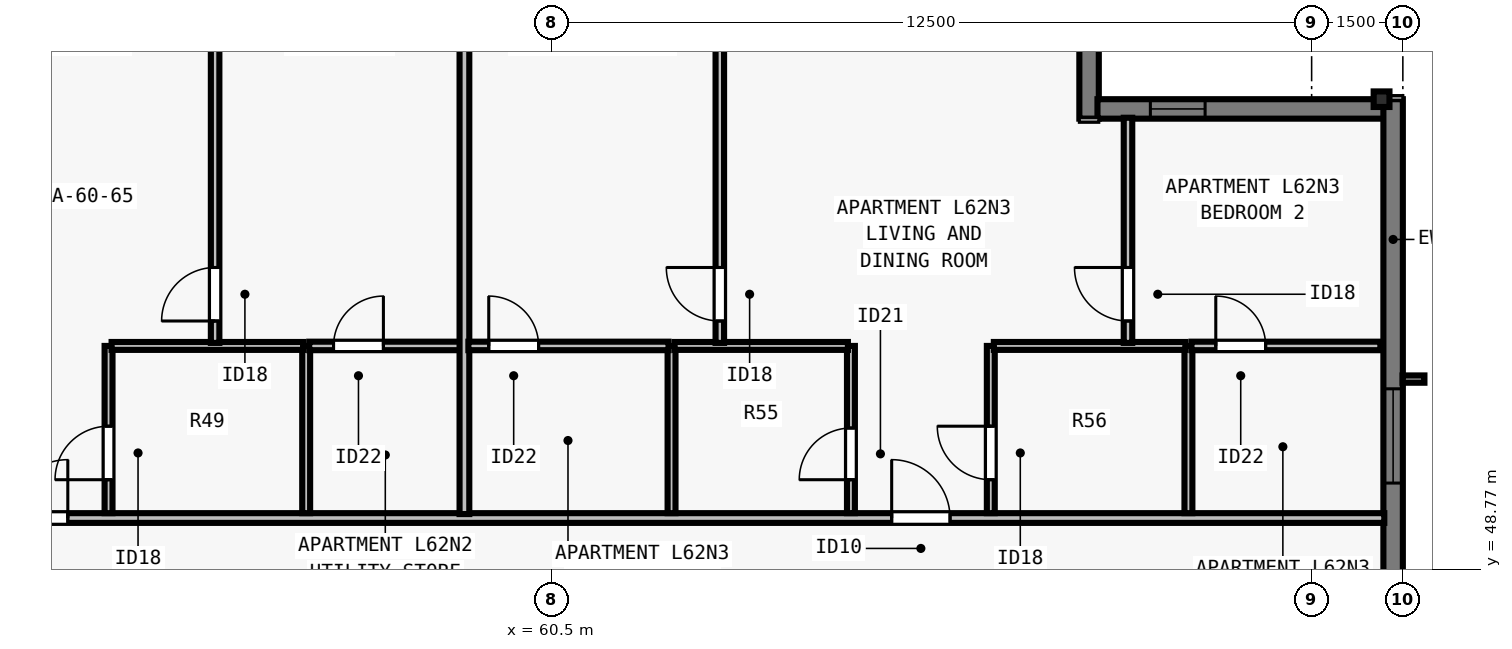
"""IFC4 building model, lengths in metres.
Left out: names, types, materials, properties, quantities, classifications, styles, units other than length and angle.
Written with IfcOpenShell. Run it as: python <this file> out.ifc"""

import sys

from ifc_helpers import new_model, si_unit, direction, frame, frame_2d, origin, origin_2d, place, context, subcontext, project, spatial, rectangle, i_section, extrude, element, fill, save


model = new_model("IFC4")
c1 = context("Model", 3, precision=1e-05, world=origin(), true_north=direction((0.0, 1.0)))
c2 = subcontext(c1, "Body", "Model", "MODEL_VIEW")
j1 = project(units=[si_unit("LENGTHUNIT", "METRE"), si_unit("PLANEANGLEUNIT", "RADIAN")], contexts=[c1])
p1 = place(None, origin())
s1 = spatial("IfcSite", under=j1, at=p1, CompositionType="ELEMENT")
p2 = place(p1, origin())
s2 = spatial("IfcBuilding", under=s1, at=p2, CompositionType="ELEMENT")
p3 = place(p2, frame((0.0, 0.0, 227.0)))
s3 = spatial("IfcBuildingStorey", under=s2, at=p3, CompositionType="ELEMENT", Elevation=227.0)
p4 = place(p3, frame((74.15, 56.5, 0.0), z_axis=(0.0, 0.0, 1.0), x_axis=(0.0, 1.0, 0.0)))
e1 = element("IfcColumn", 1, at=p4, inside=s3, PredefinedType="COLUMN", context=c2, shape_type="SweptSolid", body=[
    extrude(i_section(OverallWidth=0.256, OverallDepth=0.26, WebThickness=0.01, FlangeThickness=0.017, FilletRadius=0.013, at=origin_2d()), origin(), (0.0, 0.0, 1.0), 3.5),
])
p5 = place(p3, frame((69.34, 61.5, 0.0), z_axis=(0.0, 0.0, 1.0), x_axis=(0.0, -1.0, 0.0)))
e2 = element("IfcWall", 2, at=p5, inside=s3, PredefinedType="SOLIDWALL", context=c2, shape_type="SweptSolid", body=[
    extrude(rectangle(XDim=5.32, YDim=0.32, at=frame_2d((2.66, 0.0))), origin(), (0.0, 0.0, 1.0), 3.29),
])
p6 = place(p3, frame((69.478, 56.34, 0.0), z_axis=(0.0, 0.0, 1.0), x_axis=(1.0, 0.0, 0.0)))
e3 = element("IfcWall", 3, at=p6, inside=s3, PredefinedType="SOLIDWALL", context=c2, shape_type="SweptSolid", body=[
    extrude(rectangle(XDim=4.724, YDim=0.32, at=frame_2d((2.362, 0.0))), origin(), (0.0, 0.0, 1.0), 3.29),
])
p7 = place(p6, frame((0.87, 0.0, 0.8)))
e4 = element("IfcOpeningElement", 4, at=p7, cuts=e3, PredefinedType="OPENING", context=c2, shape_type="SweptSolid", body=[
    extrude(rectangle(XDim=0.9, YDim=1.678, at=frame_2d((0.45, 0.839))), frame((0.0, 0.17, 0.0), z_axis=(0.0, -1.0, 0.0), x_axis=(1.0, 0.0, 0.0)), (0.0, 0.0, 1.0), 0.34),
])
p8 = place(p3, frame((74.34, 56.5, 0.0), z_axis=(0.0, 0.0, 1.0), x_axis=(0.0, -1.0, 0.0)))
e5 = element("IfcWall", 5, at=p8, inside=s3, PredefinedType="SOLIDWALL", context=c2, shape_type="SweptSolid", body=[
    extrude(rectangle(XDim=34.702, YDim=0.32, at=frame_2d((17.351, 0.0))), origin(), (0.0, 0.0, 1.0), 3.29),
])
p9 = place(p8, frame((4.763, 0.0, 0.8)))
e6 = element("IfcOpeningElement", 6, at=p9, cuts=e5, PredefinedType="OPENING", context=c2, shape_type="SweptSolid", body=[
    extrude(rectangle(XDim=1.55, YDim=1.678, at=frame_2d((0.775, 0.839))), frame((0.0, 0.17, 0.0), z_axis=(0.0, -1.0, 0.0), x_axis=(1.0, 0.0, 0.0)), (0.0, 0.0, 1.0), 0.34),
])
p10 = place(p8, frame((9.238, 0.0, 0.8)))
e7 = element("IfcOpeningElement", 7, at=p10, cuts=e5, PredefinedType="OPENING", context=c2, shape_type="SweptSolid", body=[
    extrude(rectangle(XDim=1.85, YDim=1.678, at=frame_2d((0.925, 0.839))), frame((0.0, 0.17, 0.0), z_axis=(0.0, -1.0, 0.0), x_axis=(1.0, 0.0, 0.0)), (0.0, 0.0, 1.0), 0.34),
])
p11 = place(p8, frame((14.738, 0.0, 0.8)))
e8 = element("IfcOpeningElement", 8, at=p11, cuts=e5, PredefinedType="OPENING", context=c2, shape_type="SweptSolid", body=[
    extrude(rectangle(XDim=1.85, YDim=1.678, at=frame_2d((0.925, 0.839))), frame((0.0, 0.17, 0.0), z_axis=(0.0, -1.0, 0.0), x_axis=(1.0, 0.0, 0.0)), (0.0, 0.0, 1.0), 0.34),
])
p12 = place(p8, frame((18.264, 0.0, 0.8)))
e9 = element("IfcOpeningElement", 9, at=p12, cuts=e5, PredefinedType="OPENING", context=c2, shape_type="SweptSolid", body=[
    extrude(rectangle(XDim=1.55, YDim=1.678, at=frame_2d((0.775, 0.839))), frame((0.0, 0.17, 0.0), z_axis=(0.0, -1.0, 0.0), x_axis=(1.0, 0.0, 0.0)), (0.0, 0.0, 1.0), 0.34),
])
p13 = place(p8, frame((24.164, 0.0, 0.8)))
e10 = element("IfcOpeningElement", 10, at=p13, cuts=e5, PredefinedType="OPENING", context=c2, shape_type="SweptSolid", body=[
    extrude(rectangle(XDim=1.55, YDim=1.678, at=frame_2d((0.775, 0.839))), frame((0.0, 0.17, 0.0), z_axis=(0.0, -1.0, 0.0), x_axis=(1.0, 0.0, 0.0)), (0.0, 0.0, 1.0), 0.34),
])
p14 = place(p8, frame((28.689, 0.0, 0.8)))
e11 = element("IfcOpeningElement", 11, at=p14, cuts=e5, PredefinedType="OPENING", context=c2, shape_type="SweptSolid", body=[
    extrude(rectangle(XDim=1.85, YDim=1.678, at=frame_2d((0.925, 0.839))), frame((0.0, 0.17, 0.0), z_axis=(0.0, -1.0, 0.0), x_axis=(1.0, 0.0, 0.0)), (0.0, 0.0, 1.0), 0.34),
])
p15 = place(p8, frame((31.35, 0.0, 0.8)))
e12 = element("IfcOpeningElement", 12, at=p15, cuts=e5, PredefinedType="OPENING", context=c2, shape_type="SweptSolid", body=[
    extrude(rectangle(XDim=0.9, YDim=1.678, at=frame_2d((0.45, 0.839))), frame((0.0, 0.17, 0.0), z_axis=(0.0, -1.0, 0.0), x_axis=(1.0, 0.0, 0.0)), (0.0, 0.0, 1.0), 0.34),
])
p16 = place(p3, frame((29.77, 49.613, 0.0), z_axis=(0.0, 0.0, 1.0), x_axis=(1.0, 0.0, 0.0)))
e13 = element("IfcWall", 13, at=p16, inside=s3, PredefinedType="PARTITIONING", context=c2, shape_type="SweptSolid", body=[
    extrude(rectangle(XDim=44.425, YDim=0.16, at=frame_2d((22.212, 0.0))), origin(), (0.0, 0.0, 1.0), 2.958),
])
p17 = place(p16, frame((7.241, 0.0, 0.0)))
e14 = element("IfcOpeningElement", 14, at=p17, cuts=e13, PredefinedType="OPENING", context=c2, shape_type="SweptSolid", body=[
    extrude(rectangle(XDim=0.96, YDim=2.18, at=frame_2d((0.48, 1.09))), frame((0.0, 0.09, 0.0), z_axis=(0.0, -1.0, 0.0), x_axis=(1.0, 0.0, 0.0)), (0.0, 0.0, 1.0), 0.18),
])
p18 = place(p16, frame((21.815, 0.0, 0.0)))
e15 = element("IfcOpeningElement", 15, at=p18, cuts=e13, PredefinedType="OPENING", context=c2, shape_type="SweptSolid", body=[
    extrude(rectangle(XDim=0.96, YDim=2.18, at=frame_2d((0.48, 1.09))), frame((0.0, 0.09, 0.0), z_axis=(0.0, -1.0, 0.0), x_axis=(1.0, 0.0, 0.0)), (0.0, 0.0, 1.0), 0.18),
])
p19 = place(p16, frame((36.324, 0.0, 0.0)))
e16 = element("IfcOpeningElement", 16, at=p19, cuts=e13, PredefinedType="OPENING", context=c2, shape_type="SweptSolid", body=[
    extrude(rectangle(XDim=0.96, YDim=2.18, at=frame_2d((0.48, 1.09))), frame((0.0, 0.09, 0.0), z_axis=(0.0, -1.0, 0.0), x_axis=(1.0, 0.0, 0.0)), (0.0, 0.0, 1.0), 0.18),
])
p20 = place(p3, frame((56.465, 49.692, 0.0), z_axis=(0.0, 0.0, 1.0), x_axis=(0.0, 1.0, 0.0)))
e17 = element("IfcWall", 17, at=p20, inside=s3, PredefinedType="PLUMBINGWALL", context=c2, shape_type="SweptSolid", body=[
    extrude(rectangle(XDim=2.75, YDim=0.13, at=frame_2d((1.375, 0.0))), origin(), (0.0, 0.0, 1.0), 3.29),
])
p21 = place(p3, frame((53.215, 49.692, 0.0), z_axis=(0.0, 0.0, 1.0), x_axis=(0.0, 1.0, 0.0)))
e18 = element("IfcWall", 18, at=p21, inside=s3, PredefinedType="PLUMBINGWALL", context=c2, shape_type="SweptSolid", body=[
    extrude(rectangle(XDim=2.75, YDim=0.13, at=frame_2d((1.375, 0.0))), origin(), (0.0, 0.0, 1.0), 3.29),
])
p22 = place(p21, frame((0.55, 0.0, 0.0)))
e19 = element("IfcOpeningElement", 19, at=p22, cuts=e18, PredefinedType="OPENING", context=c2, shape_type="SweptSolid", body=[
    extrude(rectangle(XDim=0.88, YDim=2.1, at=frame_2d((0.44, 1.05))), frame((0.0, 0.075, 0.0), z_axis=(0.0, -1.0, 0.0), x_axis=(1.0, 0.0, 0.0)), (0.0, 0.0, 1.0), 0.15),
])
p23 = place(p3, frame((53.265, 52.442, 0.0), z_axis=(0.0, 0.0, 1.0), x_axis=(1.0, 0.0, 0.0)))
e20 = element("IfcWall", 20, at=p23, inside=s3, PredefinedType="PLUMBINGWALL", context=c2, shape_type="SweptSolid", body=[
    extrude(rectangle(XDim=3.15, YDim=0.13, at=frame_2d((1.575, 0.0))), origin(), (0.0, 0.0, 1.0), 3.29),
])
p24 = place(p3, frame((54.968, 52.492, 0.0), z_axis=(0.0, 0.0, 1.0), x_axis=(0.0, 1.0, 0.0)))
e21 = element("IfcWall", 21, at=p24, inside=s3, PredefinedType="PARTITIONING", context=c2, shape_type="SweptSolid", body=[
    extrude(rectangle(XDim=8.628, YDim=0.14, at=frame_2d((4.314, 0.0))), origin(), (0.0, 0.0, 1.0), 2.958),
])
p25 = place(p24, frame((0.36, 0.0, 0.0)))
e22 = element("IfcOpeningElement", 22, at=p25, cuts=e21, PredefinedType="OPENING", context=c2, shape_type="SweptSolid", body=[
    extrude(rectangle(XDim=0.88, YDim=2.1, at=frame_2d((0.44, 1.05))), frame((0.0, 0.08, 0.0), z_axis=(0.0, -1.0, 0.0), x_axis=(1.0, 0.0, 0.0)), (0.0, 0.0, 1.0), 0.16),
])
p26 = place(p3, frame((56.515, 52.442, 0.0), z_axis=(0.0, 0.0, 1.0), x_axis=(1.0, 0.0, 0.0)))
e23 = element("IfcWall", 23, at=p26, inside=s3, PredefinedType="PARTITIONING", context=c2, shape_type="SweptSolid", body=[
    extrude(rectangle(XDim=2.603, YDim=0.14, at=frame_2d((1.301, 0.0))), origin(), (0.0, 0.0, 1.0), 3.29),
])
p27 = place(p26, frame((0.4, 0.0, 0.0)))
e24 = element("IfcOpeningElement", 24, at=p27, cuts=e23, PredefinedType="OPENING", context=c2, shape_type="SweptSolid", body=[
    extrude(rectangle(XDim=0.82, YDim=2.1, at=frame_2d((0.41, 1.05))), frame((0.0, 0.08, 0.0), z_axis=(0.0, -1.0, 0.0), x_axis=(1.0, 0.0, 0.0)), (0.0, 0.0, 1.0), 0.16),
])
p28 = place(p3, frame((59.067, 49.677, 0.0), z_axis=(0.0, 0.0, 1.0), x_axis=(0.0, 1.0, 0.0)))
e25 = element("IfcWall", 25, at=p28, inside=s3, PredefinedType="PARTITIONING", context=c2, shape_type="SweptSolid", body=[
    extrude(rectangle(XDim=11.518, YDim=0.16, at=frame_2d((5.759, 0.0))), origin(), (0.0, 0.0, 1.0), 3.29),
])
p29 = place(p3, frame((62.474, 49.692, 0.0), z_axis=(0.0, 0.0, 1.0), x_axis=(0.0, 1.0, 0.0)))
e26 = element("IfcWall", 26, at=p29, inside=s3, PredefinedType="PLUMBINGWALL", context=c2, shape_type="SweptSolid", body=[
    extrude(rectangle(XDim=2.75, YDim=0.13, at=frame_2d((1.375, 0.0))), origin(), (0.0, 0.0, 1.0), 2.573),
])
p30 = place(p3, frame((65.424, 49.692, 0.0), z_axis=(0.0, 0.0, 1.0), x_axis=(0.0, 1.0, 0.0)))
e27 = element("IfcWall", 27, at=p30, inside=s3, PredefinedType="PLUMBINGWALL", context=c2, shape_type="SweptSolid", body=[
    extrude(rectangle(XDim=2.75, YDim=0.13, at=frame_2d((1.375, 0.0))), origin(), (0.0, 0.0, 1.0), 3.29),
])
p31 = place(p30, frame((0.55, 0.0, 0.0)))
e28 = element("IfcOpeningElement", 28, at=p31, cuts=e27, PredefinedType="OPENING", context=c2, shape_type="SweptSolid", body=[
    extrude(rectangle(XDim=0.85, YDim=2.08, at=frame_2d((0.425, 1.04))), frame((0.0, 0.075, 0.0), z_axis=(0.0, -1.0, 0.0), x_axis=(1.0, 0.0, 0.0)), (0.0, 0.0, 1.0), 0.15),
])
p32 = place(p3, frame((62.524, 52.442, 0.0), z_axis=(0.0, 0.0, 1.0), x_axis=(1.0, 0.0, 0.0)))
e29 = element("IfcWall", 29, at=p32, inside=s3, PredefinedType="PLUMBINGWALL", context=c2, shape_type="SweptSolid", body=[
    extrude(rectangle(XDim=2.85, YDim=0.13, at=frame_2d((1.425, 0.0))), origin(), (0.0, 0.0, 1.0), 3.29),
])
p33 = place(p3, frame((70.974, 49.692, 0.0), z_axis=(0.0, 0.0, 1.0), x_axis=(0.0, 1.0, 0.0)))
e30 = element("IfcWall", 30, at=p33, inside=s3, PredefinedType="PLUMBINGWALL", context=c2, shape_type="SweptSolid", body=[
    extrude(rectangle(XDim=2.75, YDim=0.13, at=frame_2d((1.375, 0.0))), origin(), (0.0, 0.0, 1.0), 3.29),
])
p34 = place(p3, frame((67.724, 49.692, 0.0), z_axis=(0.0, 0.0, 1.0), x_axis=(0.0, 1.0, 0.0)))
e31 = element("IfcWall", 31, at=p34, inside=s3, PredefinedType="PLUMBINGWALL", context=c2, shape_type="SweptSolid", body=[
    extrude(rectangle(XDim=2.75, YDim=0.13, at=frame_2d((1.375, 0.0))), origin(), (0.0, 0.0, 1.0), 3.29),
])
p35 = place(p34, frame((0.55, 0.0, 0.0)))
e32 = element("IfcOpeningElement", 32, at=p35, cuts=e31, PredefinedType="OPENING", context=c2, shape_type="SweptSolid", body=[
    extrude(rectangle(XDim=0.88, YDim=2.1, at=frame_2d((0.44, 1.05))), frame((0.0, 0.075, 0.0), z_axis=(0.0, -1.0, 0.0), x_axis=(1.0, 0.0, 0.0)), (0.0, 0.0, 1.0), 0.15),
])
p36 = place(p3, frame((67.774, 52.442, 0.0), z_axis=(0.0, 0.0, 1.0), x_axis=(1.0, 0.0, 0.0)))
e33 = element("IfcWall", 33, at=p36, inside=s3, PredefinedType="PLUMBINGWALL", context=c2, shape_type="SweptSolid", body=[
    extrude(rectangle(XDim=3.15, YDim=0.13, at=frame_2d((1.575, 0.0))), origin(), (0.0, 0.0, 1.0), 2.958),
])
p37 = place(p3, frame((63.268, 52.492, 0.0), z_axis=(0.0, 0.0, 1.0), x_axis=(0.0, 1.0, 0.0)))
e34 = element("IfcWall", 34, at=p37, inside=s3, PredefinedType="PARTITIONING", context=c2, shape_type="SweptSolid", body=[
    extrude(rectangle(XDim=8.628, YDim=0.14, at=frame_2d((4.314, 0.0))), origin(), (0.0, 0.0, 1.0), 3.29),
])
p38 = place(p37, frame((0.36, 0.0, 0.0)))
e35 = element("IfcOpeningElement", 35, at=p38, cuts=e34, PredefinedType="OPENING", context=c2, shape_type="SweptSolid", body=[
    extrude(rectangle(XDim=0.88, YDim=2.1, at=frame_2d((0.44, 1.05))), frame((0.0, 0.08, 0.0), z_axis=(0.0, -1.0, 0.0), x_axis=(1.0, 0.0, 0.0)), (0.0, 0.0, 1.0), 0.16),
])
p39 = place(p3, frame((59.133, 52.442, 0.0), z_axis=(0.0, 0.0, 1.0), x_axis=(1.0, 0.0, 0.0)))
e36 = element("IfcWall", 36, at=p39, inside=s3, PredefinedType="PARTITIONING", context=c2, shape_type="SweptSolid", body=[
    extrude(rectangle(XDim=3.291, YDim=0.14, at=frame_2d((1.646, 0.0))), origin(), (0.0, 0.0, 1.0), 3.29),
])
p40 = place(p39, frame((0.335, 0.0, 0.0)))
e37 = element("IfcOpeningElement", 37, at=p40, cuts=e36, PredefinedType="OPENING", context=c2, shape_type="SweptSolid", body=[
    extrude(rectangle(XDim=0.82, YDim=2.1, at=frame_2d((0.41, 1.05))), frame((0.0, 0.08, 0.0), z_axis=(0.0, -1.0, 0.0), x_axis=(1.0, 0.0, 0.0)), (0.0, 0.0, 1.0), 0.16),
])
p41 = place(p3, frame((69.98, 52.492, 0.0), z_axis=(0.0, 0.0, 1.0), x_axis=(0.0, 1.0, 0.0)))
e38 = element("IfcWall", 38, at=p41, inside=s3, PredefinedType="PARTITIONING", context=c2, shape_type="SweptSolid", body=[
    extrude(rectangle(XDim=3.703, YDim=0.14, at=frame_2d((1.851, 0.0))), origin(), (0.0, 0.0, 1.0), 3.29),
])
p42 = place(p41, frame((0.36, 0.0, 0.0)))
e39 = element("IfcOpeningElement", 39, at=p42, cuts=e38, PredefinedType="OPENING", context=c2, shape_type="SweptSolid", body=[
    extrude(rectangle(XDim=0.88, YDim=2.1, at=frame_2d((0.44, 1.05))), frame((0.0, 0.08, 0.0), z_axis=(0.0, -1.0, 0.0), x_axis=(1.0, 0.0, 0.0)), (0.0, 0.0, 1.0), 0.16),
])
p43 = place(p3, frame((71.024, 52.442, 0.0), z_axis=(0.0, 0.0, 1.0), x_axis=(1.0, 0.0, 0.0)))
e40 = element("IfcWall", 40, at=p43, inside=s3, PredefinedType="PARTITIONING", context=c2, shape_type="SweptSolid", body=[
    extrude(rectangle(XDim=3.106, YDim=0.14, at=frame_2d((1.553, 0.0))), origin(), (0.0, 0.0, 1.0), 3.29),
])
p44 = place(p43, frame((0.4, 0.0, 0.0)))
e41 = element("IfcOpeningElement", 41, at=p44, cuts=e40, PredefinedType="OPENING", context=c2, shape_type="SweptSolid", body=[
    extrude(rectangle(XDim=0.82, YDim=2.1, at=frame_2d((0.41, 1.05))), frame((0.0, 0.08, 0.0), z_axis=(0.0, -1.0, 0.0), x_axis=(1.0, 0.0, 0.0)), (0.0, 0.0, 1.0), 0.16),
])
p45 = place(p9, origin())
e42 = element("IfcWindow", 42, at=p45, inside=s3, PartitioningType="SINGLE_PANEL", PredefinedType="WINDOW", context=c2, shape_type="SweptSolid", body=[
    extrude(rectangle(XDim=1.55, YDim=1.678, at=frame_2d((0.775, 0.839))), frame((0.0, -0.05, 0.0), z_axis=(0.0, -1.0, 0.0), x_axis=(1.0, 0.0, 0.0)), (0.0, 0.0, 1.0), 0.06),
])
fill(e6, e42)
p46 = place(p7, origin())
e43 = element("IfcWindow", 43, at=p46, inside=s3, PartitioningType="SINGLE_PANEL", PredefinedType="WINDOW", context=c2, shape_type="SweptSolid", body=[
    extrude(rectangle(XDim=0.9, YDim=1.678, at=frame_2d((0.45, 0.839))), frame((0.0, -0.04, 0.0), z_axis=(0.0, -1.0, 0.0), x_axis=(1.0, 0.0, 0.0)), (0.0, 0.0, 1.0), 0.06),
])
fill(e4, e43)
p47 = place(p22, origin())
e44 = element("IfcDoor", 44, at=p47, inside=s3, OperationType="SINGLE_SWING_LEFT", PredefinedType="DOOR", context=c2, shape_type="SweptSolid", body=[
    extrude(rectangle(XDim=0.88, YDim=2.1, at=frame_2d((0.44, 1.05))), frame((0.0, 0.025, 0.0), z_axis=(0.0, -1.0, 0.0), x_axis=(1.0, 0.0, 0.0)), (0.0, 0.0, 1.0), 0.05),
])
fill(e19, e44)
p48 = place(p27, origin())
e45 = element("IfcDoor", 45, at=p48, inside=s3, OperationType="SINGLE_SWING_RIGHT", PredefinedType="DOOR", context=c2, shape_type="SweptSolid", body=[
    extrude(rectangle(XDim=0.82, YDim=2.1, at=frame_2d((0.41, 1.05))), frame((0.0, 0.025, 0.0), z_axis=(0.0, -1.0, 0.0), x_axis=(1.0, 0.0, 0.0)), (0.0, 0.0, 1.0), 0.05),
])
fill(e24, e45)
p49 = place(p25, origin())
e46 = element("IfcDoor", 46, at=p49, inside=s3, OperationType="SINGLE_SWING_LEFT", PredefinedType="DOOR", context=c2, shape_type="SweptSolid", body=[
    extrude(rectangle(XDim=0.88, YDim=2.1, at=frame_2d((0.44, 1.05))), frame((0.0, 0.025, 0.0), z_axis=(0.0, -1.0, 0.0), x_axis=(1.0, 0.0, 0.0)), (0.0, 0.0, 1.0), 0.05),
])
fill(e22, e46)
p50 = place(p18, origin())
e47 = element("IfcDoor", 47, at=p50, inside=s3, OperationType="SINGLE_SWING_RIGHT", PredefinedType="DOOR", context=c2, shape_type="SweptSolid", body=[
    extrude(rectangle(XDim=0.96, YDim=2.18, at=frame_2d((0.48, 1.09))), frame((0.0, 0.025, 0.0), z_axis=(0.0, -1.0, 0.0), x_axis=(1.0, 0.0, 0.0)), (0.0, 0.0, 1.0), 0.05),
])
fill(e15, e47)
p51 = place(p31, origin())
e48 = element("IfcDoor", 48, at=p51, inside=s3, OperationType="SINGLE_SWING_LEFT", PredefinedType="DOOR", context=c2, shape_type="SweptSolid", body=[
    extrude(rectangle(XDim=0.85, YDim=2.08, at=frame_2d((0.425, 1.04))), frame((0.0, 0.025, 0.0), z_axis=(0.0, -1.0, 0.0), x_axis=(1.0, 0.0, 0.0)), (0.0, 0.0, 1.0), 0.05),
])
fill(e28, e48)
p52 = place(p35, origin())
e49 = element("IfcDoor", 49, at=p52, inside=s3, OperationType="SINGLE_SWING_RIGHT", PredefinedType="DOOR", context=c2, shape_type="SweptSolid", body=[
    extrude(rectangle(XDim=0.88, YDim=2.1, at=frame_2d((0.44, 1.05))), frame((0.0, 0.025, 0.0), z_axis=(0.0, -1.0, 0.0), x_axis=(1.0, 0.0, 0.0)), (0.0, 0.0, 1.0), 0.05),
])
fill(e32, e49)
p53 = place(p40, origin())
e50 = element("IfcDoor", 50, at=p53, inside=s3, OperationType="SINGLE_SWING_LEFT", PredefinedType="DOOR", context=c2, shape_type="SweptSolid", body=[
    extrude(rectangle(XDim=0.82, YDim=2.1, at=frame_2d((0.41, 1.05))), frame((0.0, 0.025, 0.0), z_axis=(0.0, -1.0, 0.0), x_axis=(1.0, 0.0, 0.0)), (0.0, 0.0, 1.0), 0.05),
])
fill(e37, e50)
p54 = place(p38, origin())
e51 = element("IfcDoor", 51, at=p54, inside=s3, OperationType="SINGLE_SWING_RIGHT", PredefinedType="DOOR", context=c2, shape_type="SweptSolid", body=[
    extrude(rectangle(XDim=0.88, YDim=2.1, at=frame_2d((0.44, 1.05))), frame((0.0, 0.025, 0.0), z_axis=(0.0, -1.0, 0.0), x_axis=(1.0, 0.0, 0.0)), (0.0, 0.0, 1.0), 0.05),
])
fill(e35, e51)
p55 = place(p44, origin())
e52 = element("IfcDoor", 52, at=p55, inside=s3, OperationType="SINGLE_SWING_LEFT", PredefinedType="DOOR", context=c2, shape_type="SweptSolid", body=[
    extrude(rectangle(XDim=0.82, YDim=2.1, at=frame_2d((0.41, 1.05))), frame((0.0, 0.025, 0.0), z_axis=(0.0, -1.0, 0.0), x_axis=(1.0, 0.0, 0.0)), (0.0, 0.0, 1.0), 0.05),
])
fill(e41, e52)
p56 = place(p42, origin())
e53 = element("IfcDoor", 53, at=p56, inside=s3, OperationType="SINGLE_SWING_RIGHT", PredefinedType="DOOR", context=c2, shape_type="SweptSolid", body=[
    extrude(rectangle(XDim=0.88, YDim=2.1, at=frame_2d((0.44, 1.05))), frame((0.0, 0.025, 0.0), z_axis=(0.0, -1.0, 0.0), x_axis=(1.0, 0.0, 0.0)), (0.0, 0.0, 1.0), 0.05),
])
fill(e39, e53)
p57 = place(p19, origin())
e54 = element("IfcDoor", 54, at=p57, inside=s3, OperationType="SINGLE_SWING_LEFT", PredefinedType="DOOR", context=c2, shape_type="SweptSolid", body=[
    extrude(rectangle(XDim=0.96, YDim=2.18, at=frame_2d((0.48, 1.09))), frame((0.0, 0.025, 0.0), z_axis=(0.0, -1.0, 0.0), x_axis=(1.0, 0.0, 0.0)), (0.0, 0.0, 1.0), 0.05),
])
fill(e16, e54)
save(model, sys.argv[1])
